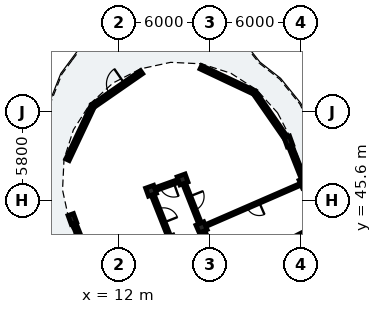
"""IFC4 building model, lengths in metres.
Left out: names, types, materials, properties, quantities, classifications, styles, units other than length and angle.
Written with IfcOpenShell. Run it as: python <this file> out.ifc"""

import sys

from ifc_helpers import new_model, si_unit, direction, frame, frame_2d, origin, origin_2d, place, context, subcontext, project, spatial, rectangle, extrude, element, fill, save


model = new_model("IFC4")
c1 = context("Model", 3, precision=1e-05, world=origin(), true_north=direction((0.0, 1.0)))
c2 = subcontext(c1, "Body", "Model", "MODEL_VIEW")
j1 = project(units=[si_unit("LENGTHUNIT", "METRE"), si_unit("PLANEANGLEUNIT", "RADIAN")], contexts=[c1])
p1 = place(None, origin())
s1 = spatial("IfcSite", under=j1, at=p1, CompositionType="ELEMENT")
p2 = place(p1, origin())
s2 = spatial("IfcBuilding", under=s1, at=p2, CompositionType="ELEMENT")
p3 = place(p2, frame((0.0, 0.0, 22.28)))
s3 = spatial("IfcBuildingStorey", under=s2, at=p3, CompositionType="ELEMENT", Elevation=22.28)
p4 = place(p3, frame((23.165, 49.479, 0.0), z_axis=(0.0, 0.0, 1.0), x_axis=(-0.941176015256, -0.337916718003, 0.0)))
e1 = element("IfcColumn", 1, at=p4, inside=s3, PredefinedType="PILASTER", context=c2, shape_type="SweptSolid", body=[
    extrude(rectangle(XDim=0.38, YDim=0.62, at=origin_2d()), origin(), (0.0, 0.0, 1.0), 3.11),
])
for number, where, z_axis, x_axis in (
    (2, (16.2, 46.979, 0.0), (0.0, 0.0, 1.0), (-0.941, -0.338, 0.0)),
    (3, (14.129, 46.236, 0.0), (0.0, 0.0, 1.0), (-0.941, -0.338, 0.0)),
):
    element("IfcColumn", number, at=place(p3, frame(where, z_axis=z_axis, x_axis=x_axis)), inside=s3, PredefinedType="COLUMN", context=c2, shape_type="SweptSolid", body=[
        extrude(rectangle(XDim=0.56, YDim=0.56, at=origin_2d()), origin(), (0.0, 0.0, 1.0), 3.11),
    ])
p5 = place(p3, frame((8.953, 44.377, 0.0), z_axis=(0.0, 0.0, 1.0), x_axis=(-0.941176015256, -0.337916718003, 0.0)))
e4 = element("IfcColumn", 4, at=p5, inside=s3, PredefinedType="PILASTER", context=c2, shape_type="SweptSolid", body=[
    extrude(rectangle(XDim=0.38, YDim=0.62, at=origin_2d()), origin(), (0.0, 0.0, 1.0), 3.11),
])
for number, where, z_axis, x_axis in (
    (5, (24.237, 46.776, 0.0), (0.0, 0.0, 1.0), (-0.917, -0.399, 0.0)),
    (6, (17.45, 43.825, 0.0), (0.0, 0.0, 1.0), (-0.917, -0.399, 0.0)),
):
    element("IfcColumn", number, at=place(p3, frame(where, z_axis=z_axis, x_axis=x_axis)), inside=s3, PredefinedType="COLUMN", context=c2, shape_type="SweptSolid", body=[
        extrude(rectangle(XDim=0.56, YDim=0.56, at=origin_2d()), origin(), (0.0, 0.0, 1.0), 3.11),
    ])
p6 = place(p3, frame((9.012, 44.228, 0.0), z_axis=(0.0, 0.0, 1.0), x_axis=(0.368503667074, -0.929626294461, 0.0)))
e7 = element("IfcWall", 7, at=p6, inside=s3, PredefinedType="SOLIDWALL", context=c2, shape_type="SweptSolid", body=[
    extrude(rectangle(XDim=3.487, YDim=0.245, at=frame_2d((1.743, 0.0))), origin(), (0.0, 0.0, 1.0), 2.355),
])
p7 = place(p6, frame((0.953, 0.0, 0.35)))
e8 = element("IfcOpeningElement", 8, at=p7, cuts=e7, PredefinedType="OPENING", context=c2, shape_type="SweptSolid", body=[
    extrude(rectangle(XDim=1.58, YDim=1.68, at=frame_2d((0.79, 0.84))), frame((0.0, 0.133, 0.0), z_axis=(0.0, -1.0, 0.0), x_axis=(1.0, 0.0, 0.0)), (0.0, 0.0, 1.0), 0.265),
])
p8 = place(p3, frame((23.224, 49.331, 0.0), z_axis=(0.0, 0.0, 1.0), x_axis=(0.368558756085, -0.9296044553, 0.0)))
e9 = element("IfcWall", 9, at=p8, inside=s3, PredefinedType="SOLIDWALL", context=c2, shape_type="SweptSolid", body=[
    extrude(rectangle(XDim=2.499, YDim=0.245, at=frame_2d((1.249, 0.0))), origin(), (0.0, 0.0, 1.0), 2.355),
])
p9 = place(p8, frame((0.549, 0.0, 0.55)))
e10 = element("IfcOpeningElement", 10, at=p9, cuts=e9, PredefinedType="OPENING", context=c2, shape_type="SweptSolid", body=[
    extrude(rectangle(XDim=1.4, YDim=1.635, at=frame_2d((0.7, 0.817))), frame((0.0, 0.133, 0.0), z_axis=(0.0, -1.0, 0.0), x_axis=(1.0, 0.0, 0.0)), (0.0, 0.0, 1.0), 0.265),
])
p10 = place(p3, frame((8.629, 48.272, 0.0), z_axis=(0.0, 0.0, 1.0), x_axis=(0.42653093848, 0.904472972796, 0.0)))
e11 = element("IfcWall", 11, at=p10, inside=s3, PredefinedType="SOLIDWALL", context=c2, shape_type="SweptSolid", body=[
    extrude(rectangle(XDim=3.908, YDim=0.245, at=frame_2d((1.954, 0.0))), origin(), (0.0, 0.0, 1.0), 2.355),
])
p11 = place(p10, frame((1.029, 0.0, 0.4)))
e12 = element("IfcOpeningElement", 12, at=p11, cuts=e11, PredefinedType="OPENING", context=c2, shape_type="SweptSolid", body=[
    extrude(rectangle(XDim=1.85, YDim=1.72, at=frame_2d((0.925, 0.86))), frame((0.0, 0.133, 0.0), z_axis=(0.0, -1.0, 0.0), x_axis=(1.0, 0.0, 0.0)), (0.0, 0.0, 1.0), 0.265),
])
p12 = place(p3, frame((10.296, 51.807, 0.0), z_axis=(0.0, 0.0, 1.0), x_axis=(0.821663343994, 0.569973112644, 0.0)))
e13 = element("IfcWall", 13, at=p12, inside=s3, PredefinedType="SOLIDWALL", context=c2, shape_type="SweptSolid", body=[
    extrude(rectangle(XDim=3.908, YDim=0.245, at=frame_2d((1.954, 0.0))), origin(), (0.0, 0.0, 1.0), 2.355),
])
p13 = place(p12, frame((1.354, 0.0, 0.0)))
e14 = element("IfcOpeningElement", 14, at=p13, cuts=e13, PredefinedType="OPENING", context=c2, shape_type="SweptSolid", body=[
    extrude(rectangle(XDim=1.2, YDim=2.15, at=frame_2d((0.6, 1.075))), frame((0.0, 0.133, 0.0), z_axis=(0.0, -1.0, 0.0), x_axis=(1.0, 0.0, 0.0)), (0.0, 0.0, 1.0), 0.265),
])
p14 = place(p3, frame((17.402, 54.358, 0.0), z_axis=(0.0, 0.0, 1.0), x_axis=(0.904437504678, -0.426606141694, 0.0)))
e15 = element("IfcWall", 15, at=p14, inside=s3, PredefinedType="SOLIDWALL", context=c2, shape_type="SweptSolid", body=[
    extrude(rectangle(XDim=3.908, YDim=0.245, at=frame_2d((1.954, 0.0))), origin(), (0.0, 0.0, 1.0), 2.355),
])
p15 = place(p14, frame((1.029, 0.0, 0.4)))
e16 = element("IfcOpeningElement", 16, at=p15, cuts=e15, PredefinedType="OPENING", context=c2, shape_type="SweptSolid", body=[
    extrude(rectangle(XDim=1.85, YDim=1.72, at=frame_2d((0.925, 0.86))), frame((0.0, 0.133, 0.0), z_axis=(0.0, -1.0, 0.0), x_axis=(1.0, 0.0, 0.0)), (0.0, 0.0, 1.0), 0.265),
])
p16 = place(p3, frame((20.937, 52.691, 0.0), z_axis=(0.0, 0.0, 1.0), x_axis=(0.570015285568, -0.82163408779, 0.0)))
e17 = element("IfcWall", 17, at=p16, inside=s3, PredefinedType="SOLIDWALL", context=c2, shape_type="SweptSolid", body=[
    extrude(rectangle(XDim=3.908, YDim=0.245, at=frame_2d((1.954, 0.0))), origin(), (0.0, 0.0, 1.0), 2.355),
])
p17 = place(p16, frame((0.979, 0.0, 0.4)))
e18 = element("IfcOpeningElement", 18, at=p17, cuts=e17, PredefinedType="OPENING", context=c2, shape_type="SweptSolid", body=[
    extrude(rectangle(XDim=1.95, YDim=1.78, at=frame_2d((0.975, 0.89))), frame((0.0, 0.133, 0.0), z_axis=(0.0, -1.0, 0.0), x_axis=(1.0, 0.0, 0.0)), (0.0, 0.0, 1.0), 0.265),
])
p18 = place(p3, frame((14.258, 45.91, 0.0), z_axis=(0.0, 0.0, 1.0), x_axis=(0.368584691693, -0.929594172233, 0.0)))
e19 = element("IfcWall", 19, at=p18, inside=s3, PredefinedType="PARTITIONING", context=c2, shape_type="SweptSolid", body=[
    extrude(rectangle(XDim=2.837, YDim=0.195, at=frame_2d((1.418, 0.0))), origin(), (0.0, 0.0, 1.0), 2.37),
])
p19 = place(p18, frame((0.934, 0.0, 0.0)))
e20 = element("IfcOpeningElement", 20, at=p19, cuts=e19, PredefinedType="OPENING", context=c2, shape_type="SweptSolid", body=[
    extrude(rectangle(XDim=0.97, YDim=2.15, at=frame_2d((0.485, 1.075))), frame((0.0, 0.107, 0.0), z_axis=(0.0, -1.0, 0.0), x_axis=(1.0, 0.0, 0.0)), (0.0, 0.0, 1.0), 0.215),
])
p20 = place(p3, frame((16.329, 46.654, 0.0), z_axis=(0.0, 0.0, 1.0), x_axis=(0.368528468945, -0.929616462622, 0.0)))
e21 = element("IfcWall", 21, at=p20, inside=s3, PredefinedType="PARTITIONING", context=c2, shape_type="SweptSolid", body=[
    extrude(rectangle(XDim=2.693, YDim=0.195, at=frame_2d((1.346, 0.0))), origin(), (0.0, 0.0, 1.0), 2.37),
])
p21 = place(p20, frame((0.862, 0.0, 0.0)))
e22 = element("IfcOpeningElement", 22, at=p21, cuts=e21, PredefinedType="OPENING", context=c2, shape_type="SweptSolid", body=[
    extrude(rectangle(XDim=0.97, YDim=2.15, at=frame_2d((0.485, 1.075))), frame((0.0, 0.107, 0.0), z_axis=(0.0, -1.0, 0.0), x_axis=(1.0, 0.0, 0.0)), (0.0, 0.0, 1.0), 0.215),
])
p22 = place(p3, frame((23.87, 46.616, 0.0), z_axis=(0.0, 0.0, 1.0), x_axis=(-0.9170582943, -0.398753162817, 0.0)))
e23 = element("IfcWall", 23, at=p22, inside=s3, PredefinedType="PARTITIONING", context=c2, shape_type="SweptSolid", body=[
    extrude(rectangle(XDim=6.6, YDim=0.125, at=frame_2d((3.3, 0.0))), origin(), (0.0, 0.0, 1.0), 2.37),
])
p23 = place(p22, frame((2.865, 0.0, 0.0)))
e24 = element("IfcOpeningElement", 24, at=p23, cuts=e23, PredefinedType="OPENING", context=c2, shape_type="SweptSolid", body=[
    extrude(rectangle(XDim=0.87, YDim=2.08, at=frame_2d((0.435, 1.04))), frame((0.0, 0.073, 0.0), z_axis=(0.0, -1.0, 0.0), x_axis=(1.0, 0.0, 0.0)), (0.0, 0.0, 1.0), 0.145),
])
p24 = place(p3, frame((17.6, 43.509, 0.0), z_axis=(0.0, 0.0, 1.0), x_axis=(0.428550049392, -0.903518043631, 0.0)))
e25 = element("IfcWall", 25, at=p24, inside=s3, PredefinedType="PARTITIONING", context=c2, shape_type="SweptSolid", body=[
    extrude(rectangle(XDim=2.693, YDim=0.195, at=frame_2d((1.346, 0.0))), origin(), (0.0, 0.0, 1.0), 2.37),
])
p25 = place(p24, frame((0.872, 0.0, 0.0)))
e26 = element("IfcOpeningElement", 26, at=p25, cuts=e25, PredefinedType="OPENING", context=c2, shape_type="SweptSolid", body=[
    extrude(rectangle(XDim=0.95, YDim=2.13, at=frame_2d((0.475, 1.065))), frame((0.0, 0.107, 0.0), z_axis=(0.0, -1.0, 0.0), x_axis=(1.0, 0.0, 0.0)), (0.0, 0.0, 1.0), 0.215),
])
p26 = place(p3, frame((25.128, 43.964, 0.0), z_axis=(0.0, 0.0, 1.0), x_axis=(-0.889022010753, -0.457864460727, 0.0)))
e27 = element("IfcWall", 27, at=p26, inside=s3, PredefinedType="PARTITIONING", context=c2, shape_type="SweptSolid", body=[
    extrude(rectangle(XDim=6.6, YDim=0.125, at=frame_2d((3.3, 0.0))), origin(), (0.0, 0.0, 1.0), 2.37),
])
p27 = place(p26, frame((2.845, 0.0, 0.0)))
e28 = element("IfcOpeningElement", 28, at=p27, cuts=e27, PredefinedType="OPENING", context=c2, shape_type="SweptSolid", body=[
    extrude(rectangle(XDim=0.91, YDim=2.1, at=frame_2d((0.455, 1.05))), frame((0.0, 0.073, 0.0), z_axis=(0.0, -1.0, 0.0), x_axis=(1.0, 0.0, 0.0)), (0.0, 0.0, 1.0), 0.145),
])
p28 = place(p3, frame((16.153, 46.962, 0.0), z_axis=(0.0, 0.0, 1.0), x_axis=(-0.941167179085, -0.337941327767, 0.0)))
e29 = element("IfcWall", 29, at=p28, inside=s3, PredefinedType="PARTITIONING", context=c2, shape_type="SweptSolid", body=[
    extrude(rectangle(XDim=2.1, YDim=0.195, at=frame_2d((1.05, 0.0))), origin(), (0.0, 0.0, 1.0), 2.37),
])
p29 = place(p28, frame((0.57, 0.0, 0.0)))
e30 = element("IfcOpeningElement", 30, at=p29, cuts=e29, PredefinedType="OPENING", context=c2, shape_type="SweptSolid", body=[
    extrude(rectangle(XDim=0.95, YDim=2.13, at=frame_2d((0.475, 1.065))), frame((0.0, 0.107, 0.0), z_axis=(0.0, -1.0, 0.0), x_axis=(1.0, 0.0, 0.0)), (0.0, 0.0, 1.0), 0.215),
])
p30 = place(p9, origin())
e31 = element("IfcWindow", 31, at=p30, inside=s3, PartitioningType="SINGLE_PANEL", PredefinedType="WINDOW", context=c2, shape_type="SweptSolid", body=[
    extrude(rectangle(XDim=1.4, YDim=1.635, at=frame_2d((0.7, 0.817))), frame((0.0, 0.03, 0.0), z_axis=(0.0, -1.0, 0.0), x_axis=(1.0, 0.0, 0.0)), (0.0, 0.0, 1.0), 0.06),
])
fill(e10, e31)
p31 = place(p11, origin())
e32 = element("IfcWindow", 32, at=p31, inside=s3, PartitioningType="SINGLE_PANEL", PredefinedType="WINDOW", context=c2, shape_type="SweptSolid", body=[
    extrude(rectangle(XDim=1.85, YDim=1.72, at=frame_2d((0.925, 0.86))), frame((0.0, 0.03, 0.0), z_axis=(0.0, -1.0, 0.0), x_axis=(1.0, 0.0, 0.0)), (0.0, 0.0, 1.0), 0.06),
])
fill(e12, e32)
p32 = place(p13, origin())
e33 = element("IfcDoor", 33, at=p32, inside=s3, OperationType="SINGLE_SWING_RIGHT", PredefinedType="DOOR", context=c2, shape_type="SweptSolid", body=[
    extrude(rectangle(XDim=1.2, YDim=2.15, at=frame_2d((0.6, 1.075))), frame((0.0, 0.025, 0.0), z_axis=(0.0, -1.0, 0.0), x_axis=(1.0, 0.0, 0.0)), (0.0, 0.0, 1.0), 0.05),
])
fill(e14, e33)
p33 = place(p15, origin())
e34 = element("IfcWindow", 34, at=p33, inside=s3, PartitioningType="SINGLE_PANEL", PredefinedType="WINDOW", context=c2, shape_type="SweptSolid", body=[
    extrude(rectangle(XDim=1.85, YDim=1.72, at=frame_2d((0.925, 0.86))), frame((0.0, 0.03, 0.0), z_axis=(0.0, -1.0, 0.0), x_axis=(1.0, 0.0, 0.0)), (0.0, 0.0, 1.0), 0.06),
])
fill(e16, e34)
p34 = place(p17, origin())
e35 = element("IfcWindow", 35, at=p34, inside=s3, PartitioningType="SINGLE_PANEL", PredefinedType="WINDOW", context=c2, shape_type="SweptSolid", body=[
    extrude(rectangle(XDim=1.95, YDim=1.78, at=frame_2d((0.975, 0.89))), frame((0.0, 0.03, 0.0), z_axis=(0.0, -1.0, 0.0), x_axis=(1.0, 0.0, 0.0)), (0.0, 0.0, 1.0), 0.06),
])
fill(e18, e35)
p35 = place(p19, origin())
e36 = element("IfcDoor", 36, at=p35, inside=s3, OperationType="SINGLE_SWING_RIGHT", PredefinedType="DOOR", context=c2, shape_type="SweptSolid", body=[
    extrude(rectangle(XDim=0.97, YDim=2.15, at=frame_2d((0.485, 1.075))), frame((0.0, 0.025, 0.0), z_axis=(0.0, -1.0, 0.0), x_axis=(1.0, 0.0, 0.0)), (0.0, 0.0, 1.0), 0.05),
])
fill(e20, e36)
p36 = place(p21, origin())
e37 = element("IfcDoor", 37, at=p36, inside=s3, OperationType="SINGLE_SWING_LEFT", PredefinedType="DOOR", context=c2, shape_type="SweptSolid", body=[
    extrude(rectangle(XDim=0.97, YDim=2.15, at=frame_2d((0.485, 1.075))), frame((0.0, 0.025, 0.0), z_axis=(0.0, -1.0, 0.0), x_axis=(1.0, 0.0, 0.0)), (0.0, 0.0, 1.0), 0.05),
])
fill(e22, e37)
p37 = place(p23, origin())
e38 = element("IfcDoor", 38, at=p37, inside=s3, OperationType="SINGLE_SWING_LEFT", PredefinedType="DOOR", context=c2, shape_type="SweptSolid", body=[
    extrude(rectangle(XDim=0.87, YDim=2.08, at=frame_2d((0.435, 1.04))), frame((0.0, 0.025, 0.0), z_axis=(0.0, -1.0, 0.0), x_axis=(1.0, 0.0, 0.0)), (0.0, 0.0, 1.0), 0.05),
])
fill(e24, e38)
p38 = place(p29, origin())
e39 = element("IfcDoor", 39, at=p38, inside=s3, OperationType="SINGLE_SWING_LEFT", PredefinedType="DOOR", context=c2, shape_type="SweptSolid", body=[
    extrude(rectangle(XDim=0.95, YDim=2.13, at=frame_2d((0.475, 1.065))), frame((0.0, 0.025, 0.0), z_axis=(0.0, -1.0, 0.0), x_axis=(1.0, 0.0, 0.0)), (0.0, 0.0, 1.0), 0.05),
])
fill(e30, e39)
save(model, sys.argv[1])
